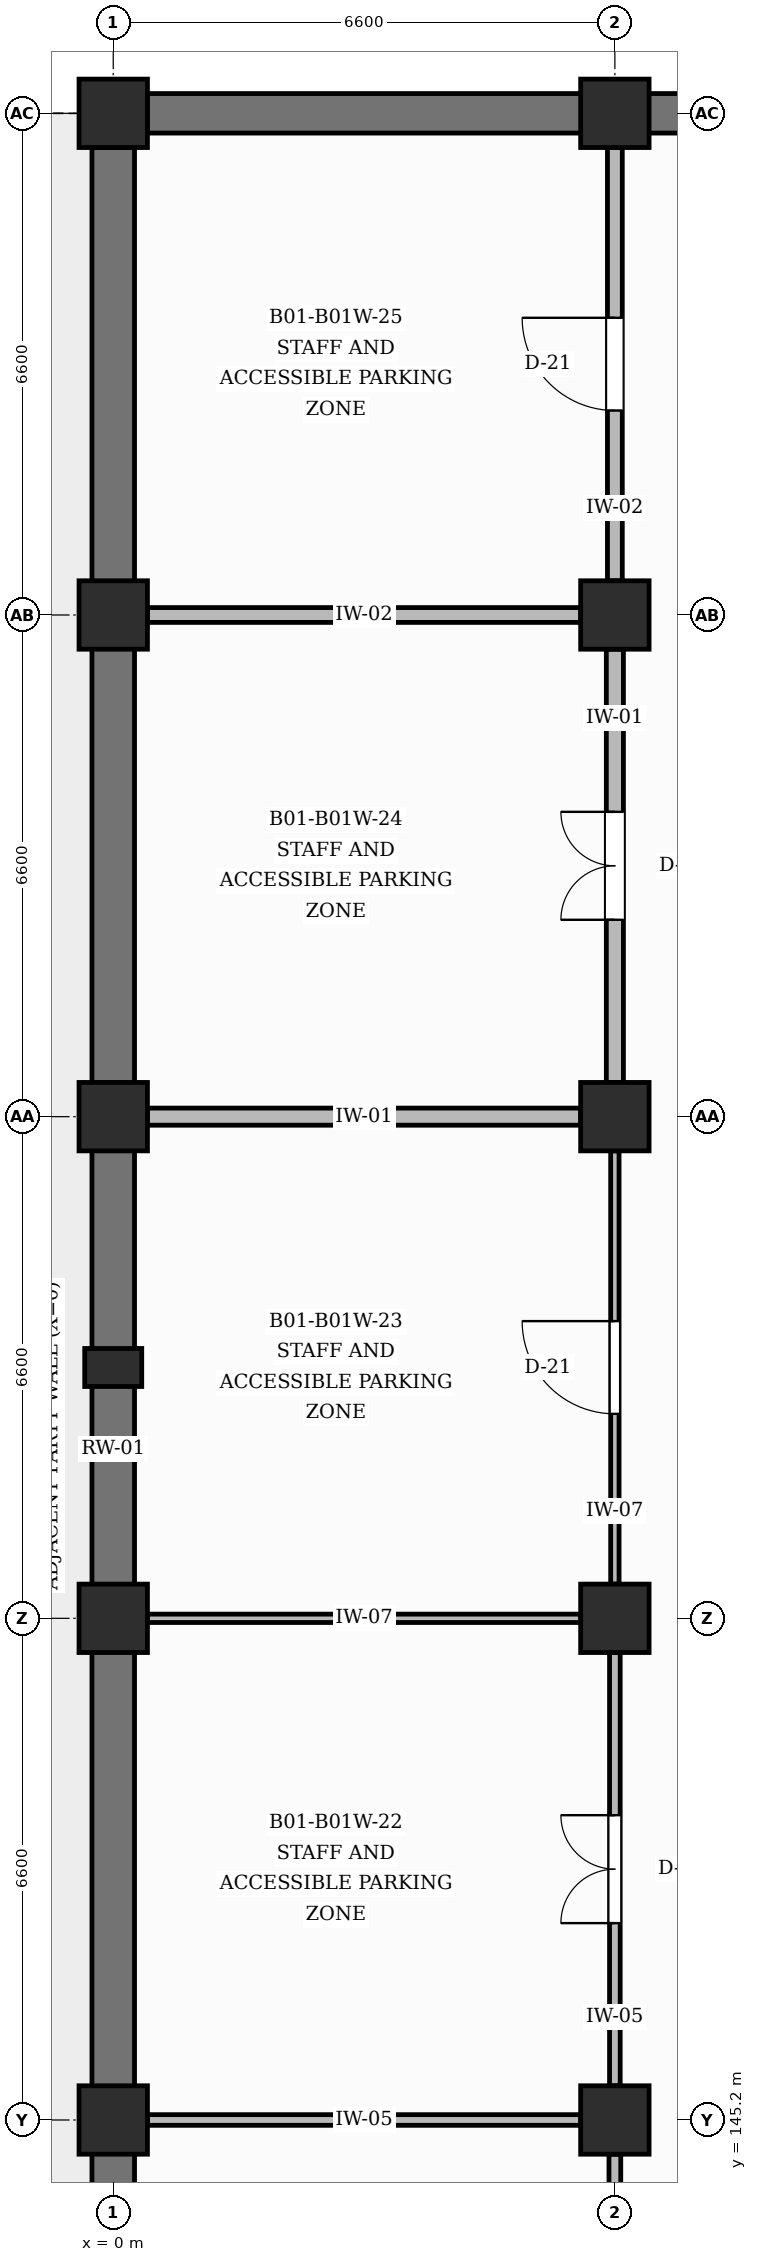
"""IFC4 building model, lengths in metres.
Left out: names, types, materials, properties, quantities, classifications, styles, units other than length and angle.
Written with IfcOpenShell. Run it as: python <this file> out.ifc"""

import sys

from ifc_helpers import new_model, si_unit, direction, frame, frame_2d, origin, origin_2d, place, context, subcontext, project, spatial, rectangle, extrude, element, fill, save


model = new_model("IFC4")
c1 = context("Model", 3, precision=1e-05, world=origin(), true_north=direction((0.0, 1.0)))
c2 = subcontext(c1, "Body", "Model", "MODEL_VIEW")
j1 = project(units=[si_unit("LENGTHUNIT", "METRE"), si_unit("PLANEANGLEUNIT", "RADIAN")], contexts=[c1])
p1 = place(None, origin())
s1 = spatial("IfcSite", under=j1, at=p1, CompositionType="ELEMENT")
p2 = place(p1, origin())
s2 = spatial("IfcBuilding", under=s1, at=p2, CompositionType="ELEMENT")
p3 = place(p2, frame((0.0, 0.0, -4.5)))
s3 = spatial("IfcBuildingStorey", under=s2, at=p3, CompositionType="ELEMENT", Elevation=-4.5)
p4 = place(p3, frame((0.0, 155.1, 0.0), z_axis=(0.0, 0.0, 1.0), x_axis=(0.0, 1.0, 0.0)))
e1 = element("IfcColumn", 1, at=p4, inside=s3, PredefinedType="PILASTER", context=c2, shape_type="SweptSolid", body=[
    extrude(rectangle(XDim=0.5, YDim=0.75, at=origin_2d()), origin(), (0.0, 0.0, 1.0), 4.5),
])
for number, where, z_axis, x_axis in (
    (2, (0.0, 145.2, 0.0), (0.0, 0.0, 1.0), (1.0, 0.0, 0.0)),
    (3, (0.0, 151.8, 0.0), (0.0, 0.0, 1.0), (1.0, 0.0, 0.0)),
    (4, (0.0, 158.4, 0.0), (0.0, 0.0, 1.0), (1.0, 0.0, 0.0)),
    (5, (0.0, 165.0, 0.0), (0.0, 0.0, 1.0), (1.0, 0.0, 0.0)),
    (6, (0.0, 171.6, 0.0), (0.0, 0.0, 1.0), (1.0, 0.0, 0.0)),
    (7, (6.6, 145.2, 0.0), (0.0, 0.0, 1.0), (1.0, 0.0, 0.0)),
    (8, (6.6, 151.8, 0.0), (0.0, 0.0, 1.0), (1.0, 0.0, 0.0)),
    (9, (6.6, 158.4, 0.0), (0.0, 0.0, 1.0), (1.0, 0.0, 0.0)),
    (10, (6.6, 165.0, 0.0), (0.0, 0.0, 1.0), (1.0, 0.0, 0.0)),
    (11, (6.6, 171.6, 0.0), (0.0, 0.0, 1.0), (1.0, 0.0, 0.0)),
):
    element("IfcColumn", number, at=place(p3, frame(where, z_axis=z_axis, x_axis=x_axis)), inside=s3, PredefinedType="COLUMN", context=c2, shape_type="SweptSolid", body=[
        extrude(rectangle(XDim=0.9, YDim=0.9, at=origin_2d()), origin(), (0.0, 0.0, 1.0), 4.5),
    ])
p5 = place(p3, frame((0.0, 139.05, 0.0), z_axis=(0.0, 0.0, 1.0), x_axis=(0.0, 1.0, 0.0)))
e12 = element("IfcWall", 12, at=p5, inside=s3, PredefinedType="USERDEFINED", context=c2, shape_type="SweptSolid", body=[
    extrude(rectangle(XDim=5.7, YDim=0.56, at=frame_2d((2.85, 0.0))), origin(), (0.0, 0.0, 1.0), 3.49),
])
p6 = place(p3, frame((0.0, 145.65, 0.0), z_axis=(0.0, 0.0, 1.0), x_axis=(0.0, 1.0, 0.0)))
e13 = element("IfcWall", 13, at=p6, inside=s3, PredefinedType="USERDEFINED", context=c2, shape_type="SweptSolid", body=[
    extrude(rectangle(XDim=5.7, YDim=0.56, at=frame_2d((2.85, 0.0))), origin(), (0.0, 0.0, 1.0), 3.49),
])
for number, where, z_axis, x_axis in (
    (14, (0.0, 152.25, 0.0), (0.0, 0.0, 1.0), (0.0, 1.0, 0.0)),
    (15, (0.0, 158.85, 0.0), (0.0, 0.0, 1.0), (0.0, 1.0, 0.0)),
):
    element("IfcWall", number, at=place(p3, frame(where, z_axis=z_axis, x_axis=x_axis)), inside=s3, PredefinedType="USERDEFINED", context=c2, shape_type="SweptSolid", body=[
        extrude(rectangle(XDim=5.7, YDim=0.56, at=frame_2d((2.85, 0.0))), origin(), (0.0, 0.0, 1.0), 3.49),
    ])
p7 = place(p3, frame((0.45, 171.6, 0.0), z_axis=(0.0, 0.0, 1.0), x_axis=(1.0, 0.0, 0.0)))
e16 = element("IfcWall", 16, at=p7, inside=s3, PredefinedType="USERDEFINED", context=c2, shape_type="SweptSolid", body=[
    extrude(rectangle(XDim=5.7, YDim=0.52, at=frame_2d((2.85, 0.0))), origin(), (0.0, 0.0, 1.0), 3.49),
])
p8 = place(p3, frame((0.0, 165.45, 0.0), z_axis=(0.0, 0.0, 1.0), x_axis=(0.0, 1.0, 0.0)))
e17 = element("IfcWall", 17, at=p8, inside=s3, PredefinedType="USERDEFINED", context=c2, shape_type="SweptSolid", body=[
    extrude(rectangle(XDim=5.7, YDim=0.56, at=frame_2d((2.85, 0.0))), origin(), (0.0, 0.0, 1.0), 3.49),
])
p9 = place(p3, frame((7.05, 171.6, 0.0), z_axis=(0.0, 0.0, 1.0), x_axis=(1.0, 0.0, 0.0)))
e18 = element("IfcWall", 18, at=p9, inside=s3, PredefinedType="USERDEFINED", context=c2, shape_type="SweptSolid", body=[
    extrude(rectangle(XDim=5.7, YDim=0.52, at=frame_2d((2.85, 0.0))), origin(), (0.0, 0.0, 1.0), 3.49),
])
p10 = place(p3, frame((6.6, 139.05, 0.0), z_axis=(0.0, 0.0, 1.0), x_axis=(0.0, 1.0, 0.0)))
e19 = element("IfcWall", 19, at=p10, inside=s3, PredefinedType="PARTITIONING", context=c2, shape_type="SweptSolid", body=[
    extrude(rectangle(XDim=5.7, YDim=0.155, at=frame_2d((2.85, 0.0))), origin(), (0.0, 0.0, 1.0), 3.34),
])
p11 = place(p10, frame((2.24, 0.0, 0.0)))
e20 = element("IfcOpeningElement", 20, at=p11, cuts=e19, PredefinedType="OPENING", context=c2, shape_type="SweptSolid", body=[
    extrude(rectangle(XDim=1.22, YDim=2.15, at=frame_2d((0.61, 1.075))), frame((0.0, 0.087, 0.0), z_axis=(0.0, -1.0, 0.0), x_axis=(1.0, 0.0, 0.0)), (0.0, 0.0, 1.0), 0.175),
])
p12 = place(p3, frame((0.45, 145.2, 0.0), z_axis=(0.0, 0.0, 1.0), x_axis=(1.0, 0.0, 0.0)))
e21 = element("IfcWall", 21, at=p12, inside=s3, PredefinedType="PARTITIONING", context=c2, shape_type="SweptSolid", body=[
    extrude(rectangle(XDim=5.7, YDim=0.14, at=frame_2d((2.85, 0.0))), origin(), (0.0, 0.0, 1.0), 3.24),
])
p13 = place(p3, frame((6.6, 145.65, 0.0), z_axis=(0.0, 0.0, 1.0), x_axis=(0.0, 1.0, 0.0)))
e22 = element("IfcWall", 22, at=p13, inside=s3, PredefinedType="PARTITIONING", context=c2, shape_type="SweptSolid", body=[
    extrude(rectangle(XDim=5.7, YDim=0.14, at=frame_2d((2.85, 0.0))), origin(), (0.0, 0.0, 1.0), 3.34),
])
p14 = place(p13, frame((2.14, 0.0, 0.0)))
e23 = element("IfcOpeningElement", 23, at=p14, cuts=e22, PredefinedType="OPENING", context=c2, shape_type="SweptSolid", body=[
    extrude(rectangle(XDim=1.42, YDim=2.2, at=frame_2d((0.71, 1.1))), frame((0.0, 0.08, 0.0), z_axis=(0.0, -1.0, 0.0), x_axis=(1.0, 0.0, 0.0)), (0.0, 0.0, 1.0), 0.16),
])
p15 = place(p3, frame((0.45, 151.8, 0.0), z_axis=(0.0, 0.0, 1.0), x_axis=(1.0, 0.0, 0.0)))
e24 = element("IfcWall", 24, at=p15, inside=s3, PredefinedType="PARTITIONING", context=c2, shape_type="SweptSolid", body=[
    extrude(rectangle(XDim=5.7, YDim=0.11, at=frame_2d((2.85, 0.0))), origin(), (0.0, 0.0, 1.0), 3.34),
])
p16 = place(p3, frame((6.6, 152.25, 0.0), z_axis=(0.0, 0.0, 1.0), x_axis=(0.0, 1.0, 0.0)))
e25 = element("IfcWall", 25, at=p16, inside=s3, PredefinedType="PARTITIONING", context=c2, shape_type="SweptSolid", body=[
    extrude(rectangle(XDim=5.7, YDim=0.11, at=frame_2d((2.85, 0.0))), origin(), (0.0, 0.0, 1.0), 3.34),
])
p17 = place(p16, frame((2.24, 0.0, 0.0)))
e26 = element("IfcOpeningElement", 26, at=p17, cuts=e25, PredefinedType="OPENING", context=c2, shape_type="SweptSolid", body=[
    extrude(rectangle(XDim=1.22, YDim=2.15, at=frame_2d((0.61, 1.075))), frame((0.0, 0.065, 0.0), z_axis=(0.0, -1.0, 0.0), x_axis=(1.0, 0.0, 0.0)), (0.0, 0.0, 1.0), 0.13),
])
p18 = place(p3, frame((0.45, 158.4, 0.0), z_axis=(0.0, 0.0, 1.0), x_axis=(1.0, 0.0, 0.0)))
e27 = element("IfcWall", 27, at=p18, inside=s3, PredefinedType="PARTITIONING", context=c2, shape_type="SweptSolid", body=[
    extrude(rectangle(XDim=5.7, YDim=0.225, at=frame_2d((2.85, 0.0))), origin(), (0.0, 0.0, 1.0), 3.24),
])
p19 = place(p3, frame((6.6, 158.85, 0.0), z_axis=(0.0, 0.0, 1.0), x_axis=(0.0, 1.0, 0.0)))
e28 = element("IfcWall", 28, at=p19, inside=s3, PredefinedType="PARTITIONING", context=c2, shape_type="SweptSolid", body=[
    extrude(rectangle(XDim=5.7, YDim=0.225, at=frame_2d((2.85, 0.0))), origin(), (0.0, 0.0, 1.0), 3.34),
])
p20 = place(p19, frame((2.14, 0.0, 0.0)))
e29 = element("IfcOpeningElement", 29, at=p20, cuts=e28, PredefinedType="OPENING", context=c2, shape_type="SweptSolid", body=[
    extrude(rectangle(XDim=1.42, YDim=2.2, at=frame_2d((0.71, 1.1))), frame((0.0, 0.123, 0.0), z_axis=(0.0, -1.0, 0.0), x_axis=(1.0, 0.0, 0.0)), (0.0, 0.0, 1.0), 0.245),
])
p21 = place(p3, frame((0.45, 165.0, 0.0), z_axis=(0.0, 0.0, 1.0), x_axis=(1.0, 0.0, 0.0)))
e30 = element("IfcWall", 30, at=p21, inside=s3, PredefinedType="PARTITIONING", context=c2, shape_type="SweptSolid", body=[
    extrude(rectangle(XDim=5.7, YDim=0.195, at=frame_2d((2.85, 0.0))), origin(), (0.0, 0.0, 1.0), 3.34),
])
p22 = place(p3, frame((6.6, 165.45, 0.0), z_axis=(0.0, 0.0, 1.0), x_axis=(0.0, 1.0, 0.0)))
e31 = element("IfcWall", 31, at=p22, inside=s3, PredefinedType="PARTITIONING", context=c2, shape_type="SweptSolid", body=[
    extrude(rectangle(XDim=5.7, YDim=0.195, at=frame_2d((2.85, 0.0))), origin(), (0.0, 0.0, 1.0), 3.34),
])
p23 = place(p22, frame((2.24, 0.0, 0.0)))
e32 = element("IfcOpeningElement", 32, at=p23, cuts=e31, PredefinedType="OPENING", context=c2, shape_type="SweptSolid", body=[
    extrude(rectangle(XDim=1.22, YDim=2.15, at=frame_2d((0.61, 1.075))), frame((0.0, 0.107, 0.0), z_axis=(0.0, -1.0, 0.0), x_axis=(1.0, 0.0, 0.0)), (0.0, 0.0, 1.0), 0.215),
])
p24 = place(p14, origin())
e33 = element("IfcDoor", 33, at=p24, inside=s3, OperationType="DOUBLE_DOOR_SINGLE_SWING", PredefinedType="DOOR", context=c2, shape_type="SweptSolid", body=[
    extrude(rectangle(XDim=1.42, YDim=2.2, at=frame_2d((0.71, 1.1))), frame((0.0, 0.025, 0.0), z_axis=(0.0, -1.0, 0.0), x_axis=(1.0, 0.0, 0.0)), (0.0, 0.0, 1.0), 0.05),
])
fill(e23, e33)
p25 = place(p17, origin())
e34 = element("IfcDoor", 34, at=p25, inside=s3, OperationType="SINGLE_SWING_RIGHT", PredefinedType="DOOR", context=c2, shape_type="SweptSolid", body=[
    extrude(rectangle(XDim=1.22, YDim=2.15, at=frame_2d((0.61, 1.075))), frame((0.0, 0.025, 0.0), z_axis=(0.0, -1.0, 0.0), x_axis=(1.0, 0.0, 0.0)), (0.0, 0.0, 1.0), 0.05),
])
fill(e26, e34)
p26 = place(p20, origin())
e35 = element("IfcDoor", 35, at=p26, inside=s3, OperationType="DOUBLE_DOOR_SINGLE_SWING", PredefinedType="DOOR", context=c2, shape_type="SweptSolid", body=[
    extrude(rectangle(XDim=1.42, YDim=2.2, at=frame_2d((0.71, 1.1))), frame((0.0, 0.025, 0.0), z_axis=(0.0, -1.0, 0.0), x_axis=(1.0, 0.0, 0.0)), (0.0, 0.0, 1.0), 0.05),
])
fill(e29, e35)
p27 = place(p23, origin())
e36 = element("IfcDoor", 36, at=p27, inside=s3, OperationType="SINGLE_SWING_RIGHT", PredefinedType="DOOR", context=c2, shape_type="SweptSolid", body=[
    extrude(rectangle(XDim=1.22, YDim=2.15, at=frame_2d((0.61, 1.075))), frame((0.0, 0.025, 0.0), z_axis=(0.0, -1.0, 0.0), x_axis=(1.0, 0.0, 0.0)), (0.0, 0.0, 1.0), 0.05),
])
fill(e32, e36)
save(model, sys.argv[1])
